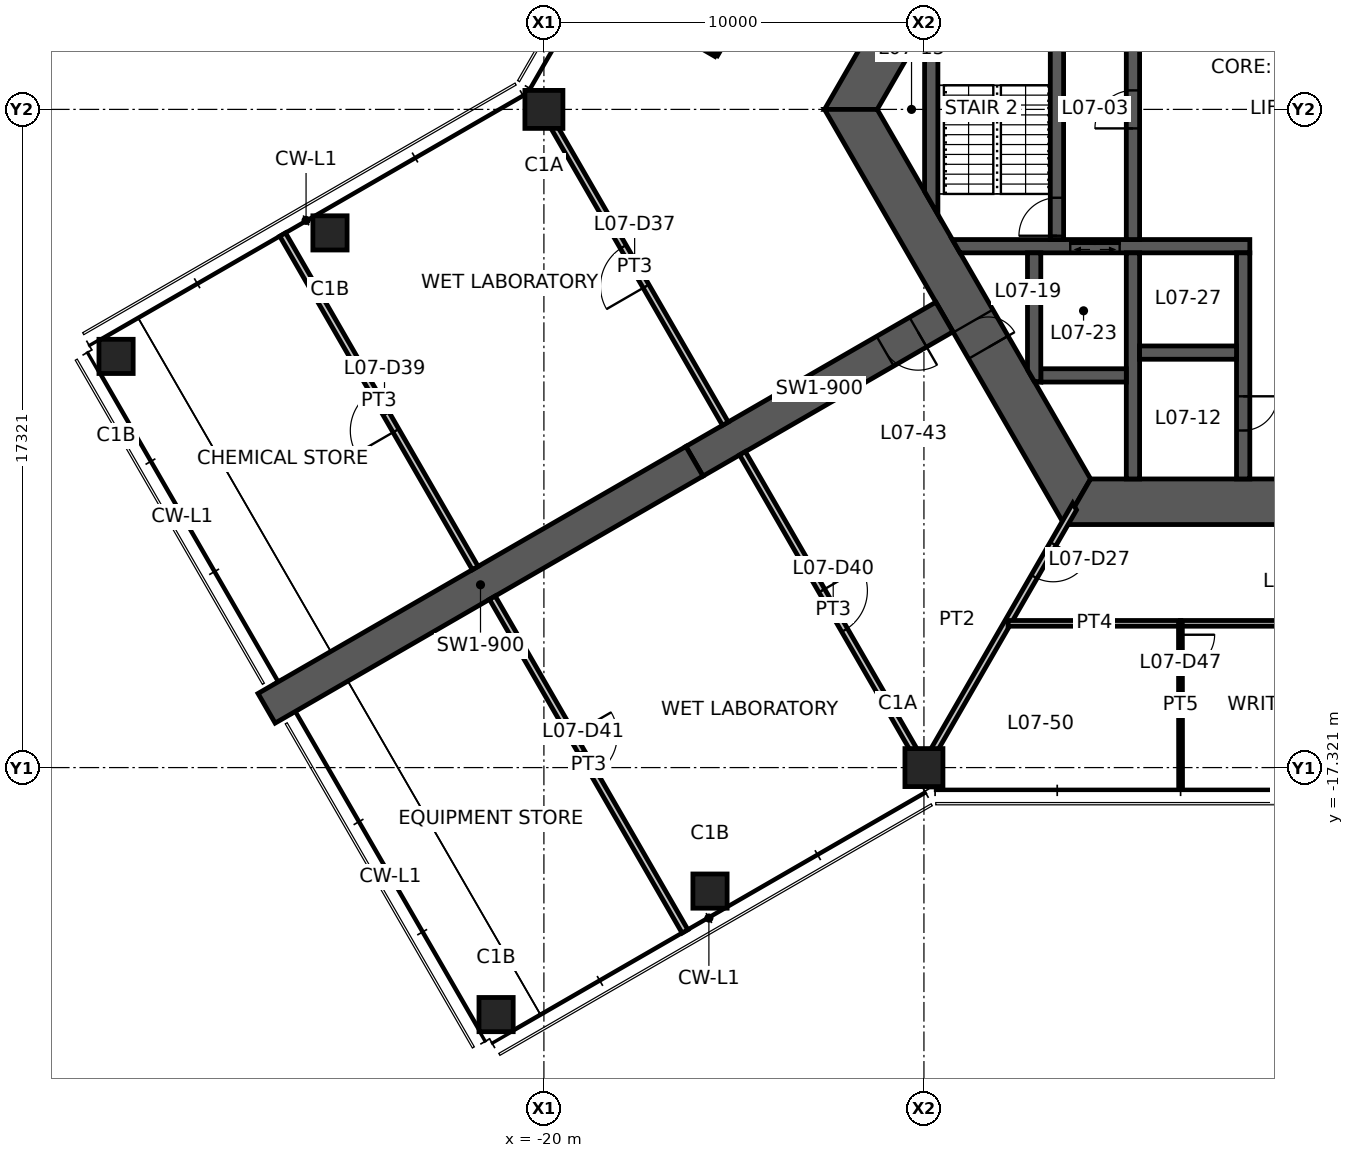
"""IFC4 building model, lengths in metres.
Left out: names, types, materials, properties, quantities, classifications, styles, units other than length and angle.
Written with IfcOpenShell. Run it as: python <this file> out.ifc"""

import sys

from ifc_helpers import new_model, si_unit, direction, frame, frame_2d, origin, origin_2d, place, context, subcontext, project, spatial, polyline, rectangle, hollow_rectangle, outline, extrude, element, fill, save


model = new_model("IFC4")
c1 = context("Model", 3, precision=1e-05, world=origin(), true_north=direction((0.0, 1.0)))
c2 = subcontext(c1, "Body", "Model", "MODEL_VIEW")
j1 = project(units=[si_unit("LENGTHUNIT", "METRE"), si_unit("PLANEANGLEUNIT", "RADIAN")], contexts=[c1])
p1 = place(None, origin())
s1 = spatial("IfcSite", under=j1, at=p1, CompositionType="ELEMENT")
p2 = place(p1, origin())
s2 = spatial("IfcBuilding", under=s1, at=p2, CompositionType="ELEMENT")
p3 = place(p2, frame((0.0, 0.0, 26.8)))
s3 = spatial("IfcBuildingStorey", under=s2, at=p3, CompositionType="ELEMENT", Elevation=26.8)
for number, where, z_axis, x_axis in (
    (1, (-20.0, 0.0, 0.0), (0.0, 0.0, 1.0), (1.0, 0.0, 0.0)),
    (2, (-10.0, -17.321, 0.0), (0.0, 0.0, 1.0), (1.0, 0.0, 0.0)),
):
    element("IfcColumn", number, at=place(p3, frame(where, z_axis=z_axis, x_axis=x_axis)), inside=s3, PredefinedType="COLUMN", context=c2, shape_type="SweptSolid", body=[
        extrude(hollow_rectangle(XDim=1.0, YDim=1.0, WallThickness=0.06, at=origin_2d()), origin(), (0.0, 0.0, 1.0), 4.2),
    ])
for number, where, z_axis, x_axis in (
    (3, (-25.629, -3.25, 0.0), (0.0, 0.0, 1.0), (1.0, 0.0, 0.0)),
    (4, (-31.258, -6.5, 0.0), (0.0, 0.0, 1.0), (1.0, 0.0, 0.0)),
    (5, (-15.629, -20.571, 0.0), (0.0, 0.0, 1.0), (1.0, 0.0, 0.0)),
    (6, (-21.258, -23.821, 0.0), (0.0, 0.0, 1.0), (1.0, 0.0, 0.0)),
):
    element("IfcColumn", number, at=place(p3, frame(where, z_axis=z_axis, x_axis=x_axis)), inside=s3, PredefinedType="COLUMN", context=c2, shape_type="SweptSolid", body=[
        extrude(hollow_rectangle(XDim=0.9, YDim=0.9, WallThickness=0.05, at=origin_2d()), origin(), (0.0, 0.0, 1.0), 4.2),
    ])
p4 = place(p3, frame((-5.961, 10.325, 0.0), z_axis=(0.0, 0.0, 1.0), x_axis=(-0.500004296715, -0.866022923061, 0.0)))
e7 = element("IfcWall", 7, at=p4, inside=s3, PredefinedType="SHEAR", context=c2, shape_type="SweptSolid", body=[
    extrude(outline(polyline([(-0.346, -0.6), (4.494, -0.6), (5.494, -0.6), (12.269, -0.6), (11.576, 0.6), (5.494, 0.6), (4.494, 0.6), (0.346, 0.6), (-0.346, -0.6)])), origin(), (0.0, 0.0, 1.0), 4.2),
])
p5 = place(p4, frame((4.494, 0.0, 0.0)))
e8 = element("IfcOpeningElement", 8, at=p5, cuts=e7, PredefinedType="OPENING", context=c2, shape_type="SweptSolid", body=[
    extrude(rectangle(XDim=1.0, YDim=2.1, at=frame_2d((0.5, 1.05))), frame((0.0, 0.61, 0.0), z_axis=(0.0, -1.0, 0.0), x_axis=(1.0, 0.0, 0.0)), (0.0, 0.0, 1.0), 1.22),
])
p6 = place(p3, frame((-11.922, 0.0, 0.0), z_axis=(0.0, 0.0, 1.0), x_axis=(0.500004296715, -0.866022923061, 0.0)))
e9 = element("IfcWall", 9, at=p6, inside=s3, PredefinedType="SHEAR", context=c2, shape_type="SweptSolid", body=[
    extrude(outline(polyline([(-0.346, -0.6), (6.431, -0.6), (7.231, -0.6), (12.269, -0.6), (11.576, 0.6), (7.231, 0.6), (6.431, 0.6), (0.346, 0.6), (-0.346, -0.6)])), origin(), (0.0, 0.0, 1.0), 4.2),
])
p7 = place(p6, frame((6.431, 0.0, 0.0)))
e10 = element("IfcOpeningElement", 10, at=p7, cuts=e9, PredefinedType="OPENING", context=c2, shape_type="SweptSolid", body=[
    extrude(rectangle(XDim=0.8, YDim=2.1, at=frame_2d((0.4, 1.05))), frame((0.0, 0.61, 0.0), z_axis=(0.0, -1.0, 0.0), x_axis=(1.0, 0.0, 0.0)), (0.0, 0.0, 1.0), 1.22),
])
p8 = place(p3, frame((-5.961, -10.325, 0.0), z_axis=(0.0, 0.0, 1.0), x_axis=(1.0, 0.0, 0.0)))
e11 = element("IfcWall", 11, at=p8, inside=s3, PredefinedType="SHEAR", context=c2, shape_type="SweptSolid", body=[
    extrude(outline(polyline([(-0.346, -0.6), (5.461, -0.6), (6.461, -0.6), (12.269, -0.6), (11.576, 0.6), (6.461, 0.6), (5.461, 0.6), (0.346, 0.6), (-0.346, -0.6)])), origin(), (0.0, 0.0, 1.0), 4.2),
])
p9 = place(p8, frame((5.461, 0.0, 0.0)))
e12 = element("IfcOpeningElement", 12, at=p9, cuts=e11, PredefinedType="OPENING", context=c2, shape_type="SweptSolid", body=[
    extrude(rectangle(XDim=1.0, YDim=2.1, at=frame_2d((0.5, 1.05))), frame((0.0, 0.61, 0.0), z_axis=(0.0, -1.0, 0.0), x_axis=(1.0, 0.0, 0.0)), (0.0, 0.0, 1.0), 1.22),
])
p10 = place(p3, frame((-9.461, -5.462, 0.0), z_axis=(0.0, 0.0, 1.0), x_axis=(-0.866019116917, -0.500010889016, 0.0)))
e13 = element("IfcWall", 13, at=p10, inside=s3, PredefinedType="SHEAR", context=c2, shape_type="SweptSolid", body=[
    extrude(rectangle(XDim=7.595, YDim=0.9, at=frame_2d((3.798, 0.0))), origin(), (0.0, 0.0, 1.0), 4.2),
])
p11 = place(p10, frame((0.8, 0.0, 0.0)))
e14 = element("IfcOpeningElement", 14, at=p11, cuts=e13, PredefinedType="OPENING", context=c2, shape_type="SweptSolid", body=[
    extrude(rectangle(XDim=1.0, YDim=2.1, at=frame_2d((0.5, 1.05))), frame((0.0, 0.46, 0.0), z_axis=(0.0, -1.0, 0.0), x_axis=(1.0, 0.0, 0.0)), (0.0, 0.0, 1.0), 0.92),
])
p12 = place(p3, frame((-16.039, -9.26, 0.0), z_axis=(0.0, 0.0, 1.0), x_axis=(-0.866024837091, -0.50000098154, 0.0)))
e15 = element("IfcWall", 15, at=p12, inside=s3, PredefinedType="SHEAR", context=c2, shape_type="SweptSolid", body=[
    extrude(rectangle(XDim=13.0, YDim=0.9, at=frame_2d((6.5, 0.0))), origin(), (0.0, 0.0, 1.0), 4.2),
])
p13 = place(p3, frame((-9.151, -3.6, 0.0), z_axis=(0.0, 0.0, 1.0), x_axis=(1.0, 0.0, 0.0)))
e16 = element("IfcWall", 16, at=p13, inside=s3, PredefinedType="SHEAR", context=c2, shape_type="SweptSolid", body=[
    extrude(outline(polyline([(0.101, -0.175), (3.001, -0.175), (4.301, -0.175), (7.726, -0.175), (7.726, 0.175), (4.301, 0.175), (3.001, 0.175), (-0.101, 0.175), (0.101, -0.175)])), origin(), (0.0, 0.0, 1.0), 4.2),
])
p14 = place(p13, frame((3.001, 0.0, 0.0)))
e17 = element("IfcOpeningElement", 17, at=p14, cuts=e16, PredefinedType="OPENING", context=c2, shape_type="SweptSolid", body=[
    extrude(rectangle(XDim=1.3, YDim=2.1, at=frame_2d((0.65, 1.05))), frame((0.0, 0.185, 0.0), z_axis=(0.0, -1.0, 0.0), x_axis=(1.0, 0.0, 0.0)), (0.0, 0.0, 1.0), 0.37),
])
p15 = place(p3, frame((-1.6, -3.775, 0.0), z_axis=(0.0, 0.0, 1.0), x_axis=(0.0, -1.0, 0.0)))
e18 = element("IfcWall", 18, at=p15, inside=s3, PredefinedType="SHEAR", context=c2, shape_type="SweptSolid", body=[
    extrude(rectangle(XDim=5.95, YDim=0.35, at=frame_2d((2.975, 0.0))), origin(), (0.0, 0.0, 1.0), 4.2),
])
p16 = place(p15, frame((3.775, 0.0, 0.0)))
e19 = element("IfcOpeningElement", 19, at=p16, cuts=e18, PredefinedType="OPENING", context=c2, shape_type="SweptSolid", body=[
    extrude(rectangle(XDim=0.9, YDim=2.1, at=frame_2d((0.45, 1.05))), frame((0.0, 0.185, 0.0), z_axis=(0.0, -1.0, 0.0), x_axis=(1.0, 0.0, 0.0)), (0.0, 0.0, 1.0), 0.37),
])
p17 = place(p3, frame((-4.5, -3.425, 0.0), z_axis=(0.0, 0.0, 1.0), x_axis=(0.0, 1.0, 0.0)))
e20 = element("IfcWall", 20, at=p17, inside=s3, PredefinedType="SHEAR", context=c2, shape_type="SweptSolid", body=[
    extrude(rectangle(XDim=6.85, YDim=0.35, at=frame_2d((3.425, 0.0))), origin(), (0.0, 0.0, 1.0), 4.2),
])
p18 = place(p17, frame((2.925, 0.0, 0.0)))
e21 = element("IfcOpeningElement", 21, at=p18, cuts=e20, PredefinedType="OPENING", context=c2, shape_type="SweptSolid", body=[
    extrude(rectangle(XDim=1.0, YDim=2.1, at=frame_2d((0.5, 1.05))), frame((0.0, 0.185, 0.0), z_axis=(0.0, -1.0, 0.0), x_axis=(1.0, 0.0, 0.0)), (0.0, 0.0, 1.0), 0.37),
])
p19 = place(p3, frame((-6.5, -3.425, 0.0), z_axis=(0.0, 0.0, 1.0), x_axis=(0.0, 1.0, 0.0)))
e22 = element("IfcWall", 22, at=p19, inside=s3, PredefinedType="SHEAR", context=c2, shape_type="SweptSolid", body=[
    extrude(rectangle(XDim=6.85, YDim=0.35, at=frame_2d((3.425, 0.0))), origin(), (0.0, 0.0, 1.0), 4.2),
])
p20 = place(p19, frame((0.1, 0.0, 0.0)))
e23 = element("IfcOpeningElement", 23, at=p20, cuts=e22, PredefinedType="OPENING", context=c2, shape_type="SweptSolid", body=[
    extrude(rectangle(XDim=1.0, YDim=2.1, at=frame_2d((0.5, 1.05))), frame((0.0, 0.185, 0.0), z_axis=(0.0, -1.0, 0.0), x_axis=(1.0, 0.0, 0.0)), (0.0, 0.0, 1.0), 0.37),
])
p21 = place(p3, frame((-4.5, -3.775, 0.0), z_axis=(0.0, 0.0, 1.0), x_axis=(0.0, -1.0, 0.0)))
e24 = element("IfcWall", 24, at=p21, inside=s3, PredefinedType="SHEAR", context=c2, shape_type="SweptSolid", body=[
    extrude(rectangle(XDim=5.95, YDim=0.35, at=frame_2d((2.975, 0.0))), origin(), (0.0, 0.0, 1.0), 4.2),
])
p22 = place(p3, frame((-4.325, -6.4, 0.0), z_axis=(0.0, 0.0, 1.0), x_axis=(1.0, 0.0, 0.0)))
e25 = element("IfcWall", 25, at=p22, inside=s3, PredefinedType="SHEAR", context=c2, shape_type="SweptSolid", body=[
    extrude(rectangle(XDim=2.55, YDim=0.35, at=frame_2d((1.275, 0.0))), origin(), (0.0, 0.0, 1.0), 4.2),
])
p23 = place(p3, frame((-6.925, -7.0, 0.0), z_axis=(0.0, 0.0, 1.0), x_axis=(1.0, 0.0, 0.0)))
e26 = element("IfcWall", 26, at=p23, inside=s3, PredefinedType="SHEAR", context=c2, shape_type="SweptSolid", body=[
    extrude(rectangle(XDim=2.25, YDim=0.35, at=frame_2d((1.125, 0.0))), origin(), (0.0, 0.0, 1.0), 4.2),
])
p24 = place(p3, frame((-7.1, -3.775, 0.0), z_axis=(0.0, 0.0, 1.0), x_axis=(0.0, -1.0, 0.0)))
e27 = element("IfcWall", 27, at=p24, inside=s3, PredefinedType="SHEAR", context=c2, shape_type="SweptSolid", body=[
    extrude(outline(polyline([(0.0, -0.175), (3.074, -0.175), (3.377, 0.0), (3.4, 0.175), (0.0, 0.175), (0.0, -0.175)])), origin(), (0.0, 0.0, 1.0), 4.2),
])
p25 = place(p3, frame((-9.808, -2.462, 0.0), z_axis=(0.0, 0.0, 1.0), x_axis=(0.0, 1.0, 0.0)))
e28 = element("IfcWall", 28, at=p25, inside=s3, PredefinedType="SHEAR", context=c2, shape_type="SweptSolid", body=[
    extrude(outline(polyline([(-0.303, -0.175), (5.228, -0.175), (4.621, 0.175), (0.303, 0.175), (-0.303, -0.175)])), origin(), (0.0, 0.0, 1.0), 4.2),
])
p26 = place(p3, frame((-6.035, -10.453, 0.0), z_axis=(0.0, 0.0, 1.0), x_axis=(-0.499993402427, -0.866029212861, 0.0)))
e29 = element("IfcWall", 29, at=p26, inside=s3, PredefinedType="PARTITIONING", context=c2, shape_type="SweptSolid", body=[
    extrude(outline(polyline([(-0.051, -0.087), (1.129, -0.087), (2.129, -0.087), (7.93, -0.087), (7.93, 0.087), (2.129, 0.087), (1.129, 0.087), (0.051, 0.087), (-0.051, -0.087)])), origin(), (0.0, 0.0, 1.0), 3.33),
])
p27 = place(p26, frame((1.129, 0.0, 0.0)))
e30 = element("IfcOpeningElement", 30, at=p27, cuts=e29, PredefinedType="OPENING", context=c2, shape_type="SweptSolid", body=[
    extrude(rectangle(XDim=1.0, YDim=2.1, at=frame_2d((0.5, 1.05))), frame((0.0, 0.098, 0.0), z_axis=(0.0, -1.0, 0.0), x_axis=(1.0, 0.0, 0.0)), (0.0, 0.0, 1.0), 0.195),
])
p28 = place(p3, frame((-15.225, -8.271, 0.0), z_axis=(0.0, 0.0, 1.0), x_axis=(-0.499993908199, 0.866028920859, 0.0)))
e31 = element("IfcWall", 31, at=p28, inside=s3, PredefinedType="PARTITIONING", context=c2, shape_type="SweptSolid", body=[
    extrude(rectangle(XDim=9.55, YDim=0.175, at=frame_2d((4.775, 0.0))), origin(), (0.0, 0.0, 1.0), 3.238),
])
p29 = place(p28, frame((4.175, 0.0, 0.0)))
e32 = element("IfcOpeningElement", 32, at=p29, cuts=e31, PredefinedType="OPENING", context=c2, shape_type="SweptSolid", body=[
    extrude(rectangle(XDim=1.2, YDim=2.1, at=frame_2d((0.6, 1.05))), frame((0.0, 0.098, 0.0), z_axis=(0.0, -1.0, 0.0), x_axis=(1.0, 0.0, 0.0)), (0.0, 0.0, 1.0), 0.195),
])
p30 = place(p3, frame((-15.475, 1.437, 0.0), z_axis=(0.0, 0.0, 1.0), x_axis=(-0.866017659399, 0.500013413428, 0.0)))
e33 = element("IfcWall", 33, at=p30, inside=s3, PredefinedType="PARTITIONING", context=c2, shape_type="SweptSolid", body=[
    extrude(rectangle(XDim=3.68, YDim=0.1, at=frame_2d((1.84, 0.0))), origin(), (0.0, 0.0, 1.0), 3.23),
])
p31 = place(p3, frame((-13.852, 4.249, 0.0), z_axis=(0.0, 0.0, 1.0), x_axis=(-0.500013214685, -0.866017774148, 0.0)))
e34 = element("IfcWall", 34, at=p31, inside=s3, PredefinedType="PARTITIONING", context=c2, shape_type="SweptSolid", body=[
    extrude(rectangle(XDim=3.247, YDim=0.1, at=frame_2d((1.623, 0.0))), origin(), (0.0, 0.0, 1.0), 3.23),
])
p32 = place(p3, frame((-21.807, -12.071, 0.0), z_axis=(0.0, 0.0, 1.0), x_axis=(-0.499994227129, 0.866028736727, 0.0)))
e35 = element("IfcWall", 35, at=p32, inside=s3, PredefinedType="PARTITIONING", context=c2, shape_type="SweptSolid", body=[
    extrude(rectangle(XDim=10.135, YDim=0.175, at=frame_2d((5.067, 0.0))), origin(), (0.0, 0.0, 1.0), 4.03),
])
p33 = place(p32, frame((4.175, 0.0, 0.0)))
e36 = element("IfcOpeningElement", 36, at=p33, cuts=e35, PredefinedType="OPENING", context=c2, shape_type="SweptSolid", body=[
    extrude(rectangle(XDim=1.2, YDim=2.1, at=frame_2d((0.6, 1.05))), frame((0.0, 0.098, 0.0), z_axis=(0.0, -1.0, 0.0), x_axis=(1.0, 0.0, 0.0)), (0.0, 0.0, 1.0), 0.195),
])
p34 = place(p3, frame((-14.775, -9.05, 0.0), z_axis=(0.0, 0.0, 1.0), x_axis=(0.499993908199, -0.866028920859, 0.0)))
e37 = element("IfcWall", 37, at=p34, inside=s3, PredefinedType="PARTITIONING", context=c2, shape_type="SweptSolid", body=[
    extrude(rectangle(XDim=9.55, YDim=0.175, at=frame_2d((4.775, 0.0))), origin(), (0.0, 0.0, 1.0), 3.238),
])
p35 = place(p34, frame((4.175, 0.0, 0.0)))
e38 = element("IfcOpeningElement", 38, at=p35, cuts=e37, PredefinedType="OPENING", context=c2, shape_type="SweptSolid", body=[
    extrude(rectangle(XDim=1.2, YDim=2.1, at=frame_2d((0.6, 1.05))), frame((0.0, 0.098, 0.0), z_axis=(0.0, -1.0, 0.0), x_axis=(1.0, 0.0, 0.0)), (0.0, 0.0, 1.0), 0.195),
])
p36 = place(p3, frame((-21.357, -12.85, 0.0), z_axis=(0.0, 0.0, 1.0), x_axis=(0.499987145745, -0.866032825065, 0.0)))
e39 = element("IfcWall", 39, at=p36, inside=s3, PredefinedType="PARTITIONING", context=c2, shape_type="SweptSolid", body=[
    extrude(rectangle(XDim=10.14, YDim=0.175, at=frame_2d((5.07, 0.0))), origin(), (0.0, 0.0, 1.0), 4.03),
])
p37 = place(p36, frame((4.175, 0.0, 0.0)))
e40 = element("IfcOpeningElement", 40, at=p37, cuts=e39, PredefinedType="OPENING", context=c2, shape_type="SweptSolid", body=[
    extrude(rectangle(XDim=1.2, YDim=2.1, at=frame_2d((0.6, 1.05))), frame((0.0, 0.098, 0.0), z_axis=(0.0, -1.0, 0.0), x_axis=(1.0, 0.0, 0.0)), (0.0, 0.0, 1.0), 0.195),
])
p38 = place(p3, frame((-3.241, -13.525, 0.0), z_axis=(0.0, 0.0, 1.0), x_axis=(-1.0, 0.0, 0.0)))
e41 = element("IfcWall", 41, at=p38, inside=s3, PredefinedType="PARTITIONING", context=c2, shape_type="SweptSolid", body=[
    extrude(rectangle(XDim=4.544, YDim=0.15, at=frame_2d((2.272, 0.0))), origin(), (0.0, 0.0, 1.0), 3.23),
])
p39 = place(p3, frame((3.251, -13.525, 0.0), z_axis=(0.0, 0.0, 1.0), x_axis=(-1.0, 0.0, 0.0)))
e42 = element("IfcWall", 42, at=p39, inside=s3, PredefinedType="PARTITIONING", context=c2, shape_type="SweptSolid", body=[
    extrude(rectangle(XDim=6.502, YDim=0.15, at=frame_2d((3.251, 0.0))), origin(), (0.0, 0.0, 1.0), 3.23),
])
p40 = place(p39, frame((2.751, 0.0, 0.0)))
e43 = element("IfcOpeningElement", 43, at=p40, cuts=e42, PredefinedType="OPENING", context=c2, shape_type="SweptSolid", body=[
    extrude(rectangle(XDim=1.0, YDim=2.1, at=frame_2d((0.5, 1.05))), frame((0.0, 0.085, 0.0), z_axis=(0.0, -1.0, 0.0), x_axis=(1.0, 0.0, 0.0)), (0.0, 0.0, 1.0), 0.17),
])
p41 = place(p3, frame((-3.251, -13.525, 0.0), z_axis=(0.0, 0.0, 1.0), x_axis=(0.001076120809, -0.999999420982, 0.0)))
e44 = element("IfcWall", 44, at=p41, inside=s3, PredefinedType="PARTITIONING", context=c2, shape_type="SweptSolid", body=[
    extrude(rectangle(XDim=4.311, YDim=0.1, at=frame_2d((2.155, 0.0))), origin(), (0.0, 0.0, 1.0), 3.23),
])
p42 = place(p41, frame((0.3, 0.0, 0.0)))
e45 = element("IfcOpeningElement", 45, at=p42, cuts=e44, PredefinedType="OPENING", context=c2, shape_type="SweptSolid", body=[
    extrude(rectangle(XDim=0.9, YDim=2.1, at=frame_2d((0.45, 1.05))), frame((0.0, 0.06, 0.0), z_axis=(0.0, -1.0, 0.0), x_axis=(1.0, 0.0, 0.0)), (0.0, 0.0, 1.0), 0.12),
])
p43 = place(p7, origin())
e46 = element("IfcDoor", 46, at=p43, inside=s3, OperationType="SINGLE_SWING_RIGHT", PredefinedType="DOOR", context=c2, shape_type="SweptSolid", body=[
    extrude(rectangle(XDim=0.8, YDim=2.1, at=frame_2d((0.4, 1.05))), frame((0.0, 0.025, 0.0), z_axis=(0.0, -1.0, 0.0), x_axis=(1.0, 0.0, 0.0)), (0.0, 0.0, 1.0), 0.05),
])
fill(e10, e46)
p44 = place(p18, origin())
e47 = element("IfcDoor", 47, at=p44, inside=s3, OperationType="SINGLE_SWING_LEFT", PredefinedType="DOOR", context=c2, shape_type="SweptSolid", body=[
    extrude(rectangle(XDim=1.0, YDim=2.1, at=frame_2d((0.5, 1.05))), frame((0.0, 0.025, 0.0), z_axis=(0.0, -1.0, 0.0), x_axis=(1.0, 0.0, 0.0)), (0.0, 0.0, 1.0), 0.05),
])
fill(e21, e47)
p45 = place(p20, origin())
e48 = element("IfcDoor", 48, at=p45, inside=s3, OperationType="SINGLE_SWING_LEFT", PredefinedType="DOOR", context=c2, shape_type="SweptSolid", body=[
    extrude(rectangle(XDim=1.0, YDim=2.1, at=frame_2d((0.5, 1.05))), frame((0.0, 0.025, 0.0), z_axis=(0.0, -1.0, 0.0), x_axis=(1.0, 0.0, 0.0)), (0.0, 0.0, 1.0), 0.05),
])
fill(e23, e48)
p46 = place(p16, origin())
e49 = element("IfcDoor", 49, at=p46, inside=s3, OperationType="SINGLE_SWING_LEFT", PredefinedType="DOOR", context=c2, shape_type="SweptSolid", body=[
    extrude(rectangle(XDim=0.9, YDim=2.1, at=frame_2d((0.45, 1.05))), frame((0.0, 0.025, 0.0), z_axis=(0.0, -1.0, 0.0), x_axis=(1.0, 0.0, 0.0)), (0.0, 0.0, 1.0), 0.05),
])
fill(e19, e49)
p47 = place(p11, origin())
e50 = element("IfcDoor", 50, at=p47, inside=s3, OperationType="SINGLE_SWING_LEFT", PredefinedType="DOOR", context=c2, shape_type="SweptSolid", body=[
    extrude(rectangle(XDim=1.0, YDim=2.1, at=frame_2d((0.5, 1.05))), frame((0.0, 0.025, 0.0), z_axis=(0.0, -1.0, 0.0), x_axis=(1.0, 0.0, 0.0)), (0.0, 0.0, 1.0), 0.05),
])
fill(e14, e50)
p48 = place(p27, origin())
e51 = element("IfcDoor", 51, at=p48, inside=s3, OperationType="SINGLE_SWING_LEFT", PredefinedType="DOOR", context=c2, shape_type="SweptSolid", body=[
    extrude(rectangle(XDim=1.0, YDim=2.1, at=frame_2d((0.5, 1.05))), frame((0.0, 0.025, 0.0), z_axis=(0.0, -1.0, 0.0), x_axis=(1.0, 0.0, 0.0)), (0.0, 0.0, 1.0), 0.05),
])
fill(e30, e51)
p49 = place(p29, origin())
e52 = element("IfcDoor", 52, at=p49, inside=s3, OperationType="DOUBLE_DOOR_SINGLE_SWING", PredefinedType="DOOR", context=c2, shape_type="SweptSolid", body=[
    extrude(rectangle(XDim=1.2, YDim=2.1, at=frame_2d((0.6, 1.05))), frame((0.0, 0.025, 0.0), z_axis=(0.0, -1.0, 0.0), x_axis=(1.0, 0.0, 0.0)), (0.0, 0.0, 1.0), 0.05),
])
fill(e32, e52)
p50 = place(p33, origin())
e53 = element("IfcDoor", 53, at=p50, inside=s3, OperationType="DOUBLE_DOOR_SINGLE_SWING", PredefinedType="DOOR", context=c2, shape_type="SweptSolid", body=[
    extrude(rectangle(XDim=1.2, YDim=2.1, at=frame_2d((0.6, 1.05))), frame((0.0, 0.025, 0.0), z_axis=(0.0, -1.0, 0.0), x_axis=(1.0, 0.0, 0.0)), (0.0, 0.0, 1.0), 0.05),
])
fill(e36, e53)
p51 = place(p35, origin())
e54 = element("IfcDoor", 54, at=p51, inside=s3, OperationType="DOUBLE_DOOR_SINGLE_SWING", PredefinedType="DOOR", context=c2, shape_type="SweptSolid", body=[
    extrude(rectangle(XDim=1.2, YDim=2.1, at=frame_2d((0.6, 1.05))), frame((0.0, 0.025, 0.0), z_axis=(0.0, -1.0, 0.0), x_axis=(1.0, 0.0, 0.0)), (0.0, 0.0, 1.0), 0.05),
])
fill(e38, e54)
p52 = place(p37, origin())
e55 = element("IfcDoor", 55, at=p52, inside=s3, OperationType="DOUBLE_DOOR_SINGLE_SWING", PredefinedType="DOOR", context=c2, shape_type="SweptSolid", body=[
    extrude(rectangle(XDim=1.2, YDim=2.1, at=frame_2d((0.6, 1.05))), frame((0.0, 0.025, 0.0), z_axis=(0.0, -1.0, 0.0), x_axis=(1.0, 0.0, 0.0)), (0.0, 0.0, 1.0), 0.05),
])
fill(e40, e55)
p53 = place(p42, origin())
e56 = element("IfcDoor", 56, at=p53, inside=s3, OperationType="SINGLE_SWING_LEFT", PredefinedType="DOOR", context=c2, shape_type="SweptSolid", body=[
    extrude(rectangle(XDim=0.9, YDim=2.1, at=frame_2d((0.45, 1.05))), frame((0.0, 0.025, 0.0), z_axis=(0.0, -1.0, 0.0), x_axis=(1.0, 0.0, 0.0)), (0.0, 0.0, 1.0), 0.05),
])
fill(e45, e56)
p54 = place(p14, origin())
e57 = element("IfcDoor", 57, at=p54, inside=s3, OperationType="DOUBLE_DOOR_SLIDING", PredefinedType="DOOR", context=c2, shape_type="SweptSolid", body=[
    extrude(rectangle(XDim=1.3, YDim=2.1, at=frame_2d((0.65, 1.05))), frame((0.0, 0.025, 0.0), z_axis=(0.0, -1.0, 0.0), x_axis=(1.0, 0.0, 0.0)), (0.0, 0.0, 1.0), 0.05),
])
fill(e17, e57)
save(model, sys.argv[1])
